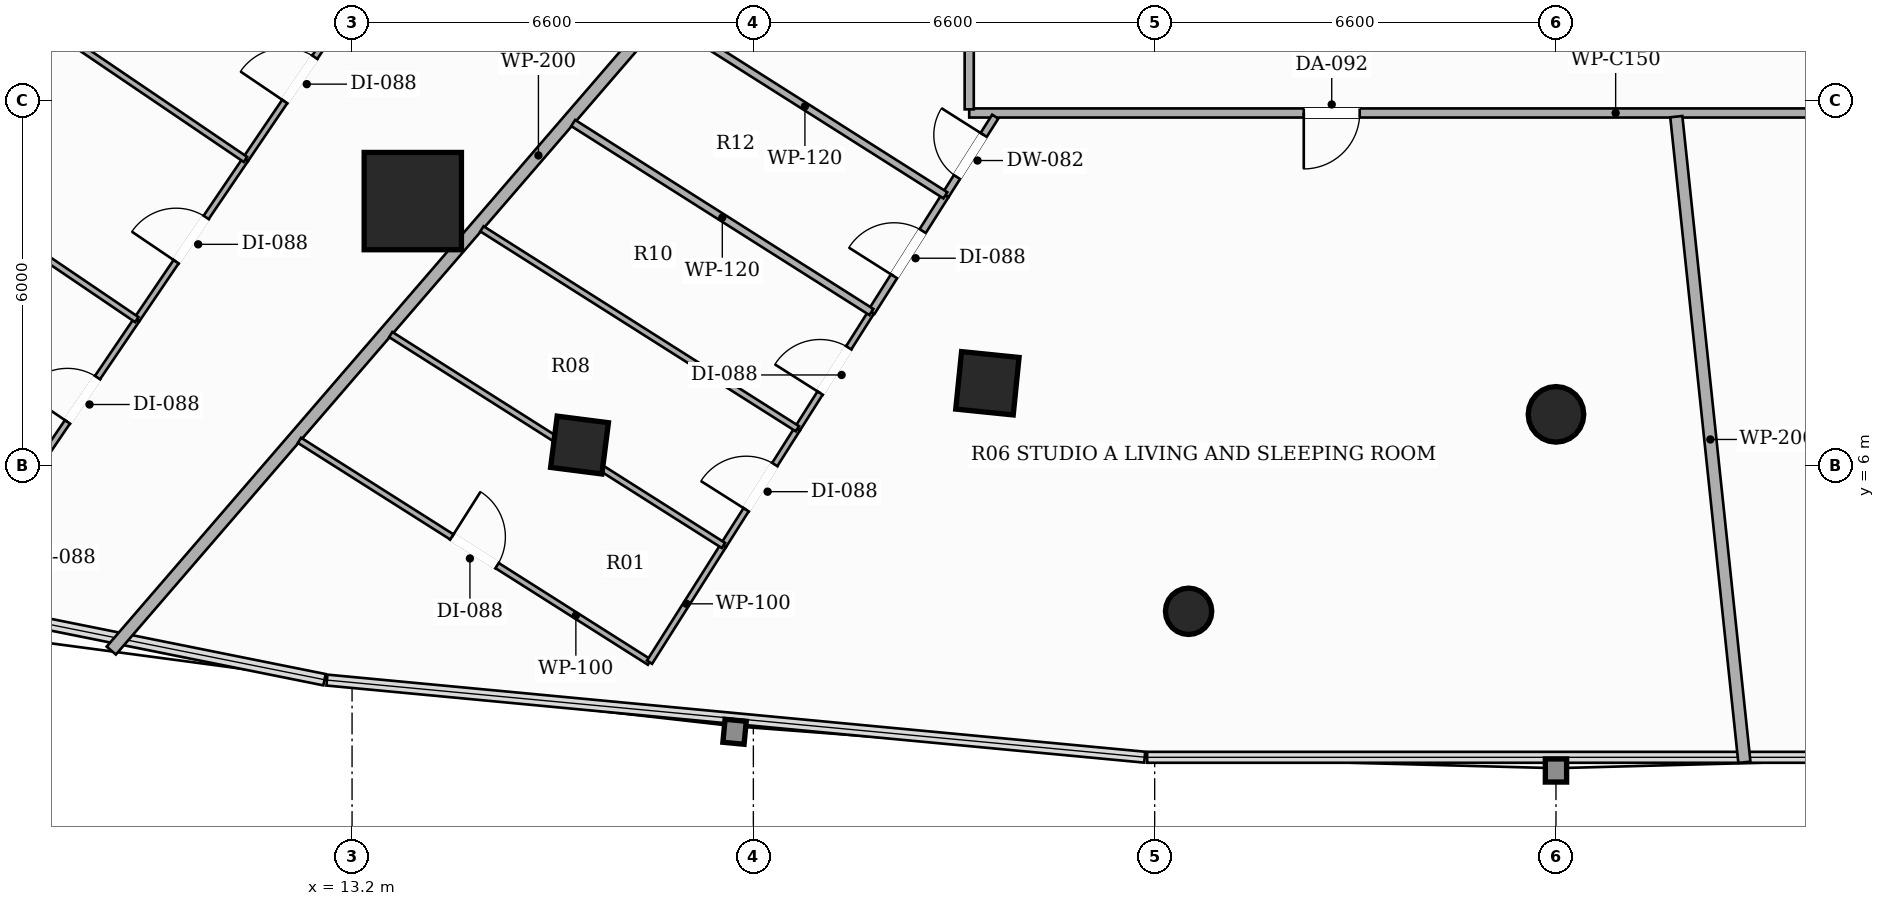
"""IFC4 building model, lengths in metres.
Left out: names, types, materials, properties, quantities, classifications, styles, units other than length and angle.
Written with IfcOpenShell. Run it as: python <this file> out.ifc"""

import sys

from ifc_helpers import new_model, si_unit, direction, frame, frame_2d, origin, origin_2d, place, context, subcontext, project, spatial, rectangle, hollow_rectangle, hollow_circle, extrude, element, fill, save


model = new_model("IFC4")
c1 = context("Model", 3, precision=1e-05, world=origin(), true_north=direction((0.0, 1.0)))
c2 = subcontext(c1, "Body", "Model", "MODEL_VIEW")
j1 = project(units=[si_unit("LENGTHUNIT", "METRE"), si_unit("PLANEANGLEUNIT", "RADIAN")], contexts=[c1])
p1 = place(None, origin())
s1 = spatial("IfcSite", under=j1, at=p1, CompositionType="ELEMENT")
p2 = place(p1, origin())
s2 = spatial("IfcBuilding", under=s1, at=p2, CompositionType="ELEMENT")
p3 = place(p2, frame((0.0, 0.0, 26.9)))
s3 = spatial("IfcBuildingStorey", under=s2, at=p3, CompositionType="ELEMENT", Elevation=26.9)
p4 = place(p3, frame((14.199, 10.351, 0.0), z_axis=(0.0, 0.0, 1.0), x_axis=(1.0, 0.0, 0.0)))
e1 = element("IfcColumn", 1, at=p4, inside=s3, PredefinedType="COLUMN", context=c2, shape_type="SweptSolid", body=[
    extrude(hollow_rectangle(XDim=1.6, YDim=1.6, WallThickness=0.05, at=origin_2d()), origin(), (0.0, 0.0, 1.0), 3.3),
])
p5 = place(p3, frame((23.649, 7.355, 0.0), z_axis=(0.0, 0.0, 1.0), x_axis=(-0.994880708829, 0.101056297183, 0.0)))
e2 = element("IfcColumn", 2, at=p5, inside=s3, PredefinedType="COLUMN", context=c2, shape_type="SweptSolid", body=[
    extrude(hollow_rectangle(XDim=0.95, YDim=0.95, WallThickness=0.032, at=origin_2d()), origin(), (0.0, 0.0, 1.0), 3.3),
])
p6 = place(p3, frame((33.0, 6.844, 0.0), z_axis=(0.0, 0.0, 1.0), x_axis=(1.0, 0.0, 0.0)))
e3 = element("IfcColumn", 3, at=p6, inside=s3, PredefinedType="COLUMN", context=c2, shape_type="SweptSolid", body=[
    extrude(hollow_circle(Radius=0.457, WallThickness=0.025, at=origin_2d()), origin(), (0.0, 0.0, 1.0), 3.3),
])
p7 = place(p3, frame((16.941, 6.339, 0.0), z_axis=(0.0, 0.0, 1.0), x_axis=(-0.99189444259, 0.127064608601, 0.0)))
e4 = element("IfcColumn", 4, at=p7, inside=s3, PredefinedType="COLUMN", context=c2, shape_type="SweptSolid", body=[
    extrude(hollow_rectangle(XDim=0.85, YDim=0.85, WallThickness=0.028, at=origin_2d()), origin(), (0.0, 0.0, 1.0), 3.3),
])
p8 = place(p3, frame((26.958, 3.605, 0.0), z_axis=(0.0, 0.0, 1.0), x_axis=(1.0, 0.0, 0.0)))
e5 = element("IfcColumn", 5, at=p8, inside=s3, PredefinedType="COLUMN", context=c2, shape_type="SweptSolid", body=[
    extrude(hollow_circle(Radius=0.381, WallThickness=0.022, at=origin_2d()), origin(), (0.0, 0.0, 1.0), 3.3),
])
p9 = place(p3, frame((42.59, 11.8, 0.0), z_axis=(0.0, 0.0, 1.0), x_axis=(-1.0, 0.0, 0.0)))
e6 = element("IfcWall", 6, at=p9, inside=s3, PredefinedType="PARTITIONING", context=c2, shape_type="SweptSolid", body=[
    extrude(rectangle(XDim=19.24, YDim=0.15, at=frame_2d((9.62, 0.0))), origin(), (0.0, 0.0, 1.0), 2.669),
])
p10 = place(p9, frame((12.818, 0.0, 0.0)))
e7 = element("IfcOpeningElement", 7, at=p10, cuts=e6, PredefinedType="OPENING", context=c2, shape_type="SweptSolid", body=[
    extrude(rectangle(XDim=0.92, YDim=2.15, at=frame_2d((0.46, 1.075))), frame((0.0, 0.085, 0.0), z_axis=(0.0, -1.0, 0.0), x_axis=(1.0, 0.0, 0.0)), (0.0, 0.0, 1.0), 0.17),
])
p11 = place(p9, frame((3.519, 0.0, 0.0)))
e8 = element("IfcOpeningElement", 8, at=p11, cuts=e6, PredefinedType="OPENING", context=c2, shape_type="SweptSolid", body=[
    extrude(rectangle(XDim=0.88, YDim=2.1, at=frame_2d((0.44, 1.05))), frame((0.0, 0.085, 0.0), z_axis=(0.0, -1.0, 0.0), x_axis=(1.0, 0.0, 0.0)), (0.0, 0.0, 1.0), 0.17),
])
p12 = place(p3, frame((23.35, 11.86, 0.0), z_axis=(0.0, 0.0, 1.0), x_axis=(0.0, 1.0, 0.0)))
e9 = element("IfcWall", 9, at=p12, inside=s3, PredefinedType="PARTITIONING", context=c2, shape_type="SweptSolid", body=[
    extrude(rectangle(XDim=25.04, YDim=0.15, at=frame_2d((12.52, 0.0))), origin(), (0.0, 0.0, 1.0), 2.413),
])
p13 = place(p12, frame((9.872, 0.0, 0.0)))
e10 = element("IfcOpeningElement", 10, at=p13, cuts=e9, PredefinedType="OPENING", context=c2, shape_type="SweptSolid", body=[
    extrude(rectangle(XDim=0.92, YDim=2.15, at=frame_2d((0.46, 1.075))), frame((0.0, 0.085, 0.0), z_axis=(0.0, -1.0, 0.0), x_axis=(1.0, 0.0, 0.0)), (0.0, 0.0, 1.0), 0.17),
])
p14 = place(p12, frame((18.578, 0.0, 0.0)))
e11 = element("IfcOpeningElement", 11, at=p14, cuts=e9, PredefinedType="OPENING", context=c2, shape_type="SweptSolid", body=[
    extrude(rectangle(XDim=0.88, YDim=2.1, at=frame_2d((0.44, 1.05))), frame((0.0, 0.085, 0.0), z_axis=(0.0, -1.0, 0.0), x_axis=(1.0, 0.0, 0.0)), (0.0, 0.0, 1.0), 0.17),
])
p15 = place(p3, frame((9.24, 2.959, 0.0), z_axis=(0.0, 0.0, 1.0), x_axis=(0.653213734957, 0.757173570896, 0.0)))
e12 = element("IfcWall", 12, at=p15, inside=s3, PredefinedType="PARTITIONING", context=c2, shape_type="SweptSolid", body=[
    extrude(rectangle(XDim=21.509, YDim=0.2, at=frame_2d((10.754, 0.0))), origin(), (0.0, 0.0, 1.0), 2.413),
])
p16 = place(p3, frame((34.979, 11.74, 0.0), z_axis=(0.0, 0.0, 1.0), x_axis=(0.104910939681, -0.994481621115, 0.0)))
e13 = element("IfcWall", 13, at=p16, inside=s3, PredefinedType="PARTITIONING", context=c2, shape_type="SweptSolid", body=[
    extrude(rectangle(XDim=10.677, YDim=0.2, at=frame_2d((5.338, 0.0))), origin(), (0.0, 0.0, 1.0), 2.413),
])
p17 = place(p3, frame((22.958, 10.446, 0.0), z_axis=(0.0, 0.0, 1.0), x_axis=(0.535317457649, 0.844650945383, 0.0)))
e14 = element("IfcWall", 14, at=p17, inside=s3, PredefinedType="PARTITIONING", context=c2, shape_type="SweptSolid", body=[
    extrude(rectangle(XDim=1.532, YDim=0.12, at=frame_2d((0.766, 0.0))), origin(), (0.0, 0.0, 1.0), 3.06),
])
p18 = place(p17, frame((0.356, 0.0, 0.0)))
e15 = element("IfcOpeningElement", 15, at=p18, cuts=e14, PredefinedType="OPENING", context=c2, shape_type="SweptSolid", body=[
    extrude(rectangle(XDim=0.82, YDim=2.1, at=frame_2d((0.41, 1.05))), frame((0.0, 0.07, 0.0), z_axis=(0.0, -1.0, 0.0), x_axis=(1.0, 0.0, 0.0)), (0.0, 0.0, 1.0), 0.14),
])
p19 = place(p3, frame((21.741, 8.527, 0.0), z_axis=(0.0, 0.0, 1.0), x_axis=(0.535588747522, 0.844478947948, 0.0)))
e16 = element("IfcWall", 16, at=p19, inside=s3, PredefinedType="PARTITIONING", context=c2, shape_type="SweptSolid", body=[
    extrude(rectangle(XDim=2.272, YDim=0.12, at=frame_2d((1.136, 0.0))), origin(), (0.0, 0.0, 1.0), 3.06),
])
p20 = place(p19, frame((0.696, 0.0, 0.0)))
e17 = element("IfcOpeningElement", 17, at=p20, cuts=e16, PredefinedType="OPENING", context=c2, shape_type="SweptSolid", body=[
    extrude(rectangle(XDim=0.88, YDim=2.1, at=frame_2d((0.44, 1.05))), frame((0.0, 0.07, 0.0), z_axis=(0.0, -1.0, 0.0), x_axis=(1.0, 0.0, 0.0)), (0.0, 0.0, 1.0), 0.14),
])
p21 = place(p3, frame((12.335, 6.417, 0.0), z_axis=(0.0, 0.0, 1.0), x_axis=(0.844634990869, -0.535342630657, 0.0)))
e18 = element("IfcWall", 18, at=p21, inside=s3, PredefinedType="PARTITIONING", context=c2, shape_type="SweptSolid", body=[
    extrude(rectangle(XDim=6.816, YDim=0.1, at=frame_2d((3.408, 0.0))), origin(), (0.0, 0.0, 1.0), 2.619),
])
p22 = place(p21, frame((2.968, 0.0, 0.0)))
e19 = element("IfcOpeningElement", 19, at=p22, cuts=e18, PredefinedType="OPENING", context=c2, shape_type="SweptSolid", body=[
    extrude(rectangle(XDim=0.88, YDim=2.1, at=frame_2d((0.44, 1.05))), frame((0.0, 0.06, 0.0), z_axis=(0.0, -1.0, 0.0), x_axis=(1.0, 0.0, 0.0)), (0.0, 0.0, 1.0), 0.12),
])
p23 = place(p3, frame((18.092, 2.768, 0.0), z_axis=(0.0, 0.0, 1.0), x_axis=(0.535087860904, 0.844796414003, 0.0)))
e20 = element("IfcWall", 20, at=p23, inside=s3, PredefinedType="PARTITIONING", context=c2, shape_type="SweptSolid", body=[
    extrude(rectangle(XDim=2.273, YDim=0.1, at=frame_2d((1.136, 0.0))), origin(), (0.0, 0.0, 1.0), 3.06),
])
p24 = place(p3, frame((19.308, 4.688, 0.0), z_axis=(0.0, 0.0, 1.0), x_axis=(0.535512120593, 0.844527541705, 0.0)))
e21 = element("IfcWall", 21, at=p24, inside=s3, PredefinedType="PARTITIONING", context=c2, shape_type="SweptSolid", body=[
    extrude(rectangle(XDim=2.272, YDim=0.1, at=frame_2d((1.136, 0.0))), origin(), (0.0, 0.0, 1.0), 2.413),
])
p25 = place(p24, frame((0.696, 0.0, 0.0)))
e22 = element("IfcOpeningElement", 22, at=p25, cuts=e21, PredefinedType="OPENING", context=c2, shape_type="SweptSolid", body=[
    extrude(rectangle(XDim=0.88, YDim=2.1, at=frame_2d((0.44, 1.05))), frame((0.0, 0.06, 0.0), z_axis=(0.0, -1.0, 0.0), x_axis=(1.0, 0.0, 0.0)), (0.0, 0.0, 1.0), 0.12),
])
p26 = place(p3, frame((20.525, 6.607, 0.0), z_axis=(0.0, 0.0, 1.0), x_axis=(0.53503930364, 0.844827167864, 0.0)))
e23 = element("IfcWall", 23, at=p26, inside=s3, PredefinedType="PARTITIONING", context=c2, shape_type="SweptSolid", body=[
    extrude(rectangle(XDim=2.273, YDim=0.1, at=frame_2d((1.136, 0.0))), origin(), (0.0, 0.0, 1.0), 2.413),
])
p27 = place(p26, frame((0.696, 0.0, 0.0)))
e24 = element("IfcOpeningElement", 24, at=p27, cuts=e23, PredefinedType="OPENING", context=c2, shape_type="SweptSolid", body=[
    extrude(rectangle(XDim=0.88, YDim=2.1, at=frame_2d((0.44, 1.05))), frame((0.0, 0.06, 0.0), z_axis=(0.0, -1.0, 0.0), x_axis=(1.0, 0.0, 0.0)), (0.0, 0.0, 1.0), 0.12),
])
p28 = place(p3, frame((22.958, 10.446, 0.0), z_axis=(0.0, 0.0, 1.0), x_axis=(-0.844661668189, 0.535300538289, 0.0)))
e25 = element("IfcWall", 25, at=p28, inside=s3, PredefinedType="PARTITIONING", context=c2, shape_type="SweptSolid", body=[
    extrude(rectangle(XDim=5.47, YDim=0.12, at=frame_2d((2.735, 0.0))), origin(), (0.0, 0.0, 1.0), 2.669),
])
p29 = place(p3, frame((21.741, 8.527, 0.0), z_axis=(0.0, 0.0, 1.0), x_axis=(-0.84466254328, 0.535299157463, 0.0)))
e26 = element("IfcWall", 26, at=p29, inside=s3, PredefinedType="PARTITIONING", context=c2, shape_type="SweptSolid", body=[
    extrude(rectangle(XDim=5.806, YDim=0.12, at=frame_2d((2.903, 0.0))), origin(), (0.0, 0.0, 1.0), 2.669),
])
p30 = place(p3, frame((13.836, 8.156, 0.0), z_axis=(0.0, 0.0, 1.0), x_axis=(0.844657780298, -0.535306673023, 0.0)))
e27 = element("IfcWall", 27, at=p30, inside=s3, PredefinedType="PARTITIONING", context=c2, shape_type="SweptSolid", body=[
    extrude(rectangle(XDim=6.479, YDim=0.1, at=frame_2d((3.239, 0.0))), origin(), (0.0, 0.0, 1.0), 2.413),
])
p31 = place(p3, frame((15.336, 9.895, 0.0), z_axis=(0.0, 0.0, 1.0), x_axis=(0.844690904033, -0.535254403666, 0.0)))
e28 = element("IfcWall", 28, at=p31, inside=s3, PredefinedType="PARTITIONING", context=c2, shape_type="SweptSolid", body=[
    extrude(rectangle(XDim=6.143, YDim=0.1, at=frame_2d((3.072, 0.0))), origin(), (0.0, 0.0, 1.0), 2.413),
])
p32 = place(p3, frame((11.447, 11.036, 0.0), z_axis=(0.0, 0.0, 1.0), x_axis=(0.561180574224, 0.827693399221, 0.0)))
e29 = element("IfcWall", 29, at=p32, inside=s3, PredefinedType="PARTITIONING", context=c2, shape_type="SweptSolid", body=[
    extrude(rectangle(XDim=3.182, YDim=0.1, at=frame_2d((1.591, 0.0))), origin(), (0.0, 0.0, 1.0), 2.413),
])
p33 = place(p32, frame((1.151, 0.0, 0.0)))
e30 = element("IfcOpeningElement", 30, at=p33, cuts=e29, PredefinedType="OPENING", context=c2, shape_type="SweptSolid", body=[
    extrude(rectangle(XDim=0.88, YDim=2.1, at=frame_2d((0.44, 1.05))), frame((0.0, 0.06, 0.0), z_axis=(0.0, -1.0, 0.0), x_axis=(1.0, 0.0, 0.0)), (0.0, 0.0, 1.0), 0.12),
])
p34 = place(p3, frame((9.66, 8.402, 0.0), z_axis=(0.0, 0.0, 1.0), x_axis=(0.561478909132, 0.827491048048, 0.0)))
e31 = element("IfcWall", 31, at=p34, inside=s3, PredefinedType="PARTITIONING", context=c2, shape_type="SweptSolid", body=[
    extrude(rectangle(XDim=3.183, YDim=0.1, at=frame_2d((1.591, 0.0))), origin(), (0.0, 0.0, 1.0), 2.619),
])
p35 = place(p34, frame((1.151, 0.0, 0.0)))
e32 = element("IfcOpeningElement", 32, at=p35, cuts=e31, PredefinedType="OPENING", context=c2, shape_type="SweptSolid", body=[
    extrude(rectangle(XDim=0.88, YDim=2.1, at=frame_2d((0.44, 1.05))), frame((0.0, 0.06, 0.0), z_axis=(0.0, -1.0, 0.0), x_axis=(1.0, 0.0, 0.0)), (0.0, 0.0, 1.0), 0.12),
])
p36 = place(p3, frame((7.873, 5.768, 0.0), z_axis=(0.0, 0.0, 1.0), x_axis=(0.561390746336, 0.827550862442, 0.0)))
e33 = element("IfcWall", 33, at=p36, inside=s3, PredefinedType="PARTITIONING", context=c2, shape_type="SweptSolid", body=[
    extrude(rectangle(XDim=3.183, YDim=0.1, at=frame_2d((1.591, 0.0))), origin(), (0.0, 0.0, 1.0), 2.619),
])
p37 = place(p36, frame((1.151, 0.0, 0.0)))
e34 = element("IfcOpeningElement", 34, at=p37, cuts=e33, PredefinedType="OPENING", context=c2, shape_type="SweptSolid", body=[
    extrude(rectangle(XDim=0.88, YDim=2.1, at=frame_2d((0.44, 1.05))), frame((0.0, 0.06, 0.0), z_axis=(0.0, -1.0, 0.0), x_axis=(1.0, 0.0, 0.0)), (0.0, 0.0, 1.0), 0.12),
])
p38 = place(p3, frame((11.447, 11.036, 0.0), z_axis=(0.0, 0.0, 1.0), x_axis=(-0.827600351797, 0.561317786735, 0.0)))
e35 = element("IfcWall", 35, at=p38, inside=s3, PredefinedType="PARTITIONING", context=c2, shape_type="SweptSolid", body=[
    extrude(rectangle(XDim=5.332, YDim=0.1, at=frame_2d((2.666, 0.0))), origin(), (0.0, 0.0, 1.0), 3.06),
])
p39 = place(p3, frame((9.66, 8.402, 0.0), z_axis=(0.0, 0.0, 1.0), x_axis=(-0.827540801305, 0.561405577257, 0.0)))
e36 = element("IfcWall", 36, at=p39, inside=s3, PredefinedType="PARTITIONING", context=c2, shape_type="SweptSolid", body=[
    extrude(rectangle(XDim=4.734, YDim=0.1, at=frame_2d((2.367, 0.0))), origin(), (0.0, 0.0, 1.0), 2.619),
])
p40 = place(p10, origin())
e37 = element("IfcDoor", 37, at=p40, inside=s3, OperationType="SINGLE_SWING_RIGHT", PredefinedType="DOOR", context=c2, shape_type="SweptSolid", body=[
    extrude(rectangle(XDim=0.92, YDim=2.15, at=frame_2d((0.46, 1.075))), frame((0.0, 0.025, 0.0), z_axis=(0.0, -1.0, 0.0), x_axis=(1.0, 0.0, 0.0)), (0.0, 0.0, 1.0), 0.05),
])
fill(e7, e37)
p41 = place(p18, origin())
e38 = element("IfcDoor", 38, at=p41, inside=s3, OperationType="SINGLE_SWING_RIGHT", PredefinedType="DOOR", context=c2, shape_type="SweptSolid", body=[
    extrude(rectangle(XDim=0.82, YDim=2.1, at=frame_2d((0.41, 1.05))), frame((0.0, 0.025, 0.0), z_axis=(0.0, -1.0, 0.0), x_axis=(1.0, 0.0, 0.0)), (0.0, 0.0, 1.0), 0.05),
])
fill(e15, e38)
p42 = place(p20, origin())
e39 = element("IfcDoor", 39, at=p42, inside=s3, OperationType="SINGLE_SWING_LEFT", PredefinedType="DOOR", context=c2, shape_type="SweptSolid", body=[
    extrude(rectangle(XDim=0.88, YDim=2.1, at=frame_2d((0.44, 1.05))), frame((0.0, 0.025, 0.0), z_axis=(0.0, -1.0, 0.0), x_axis=(1.0, 0.0, 0.0)), (0.0, 0.0, 1.0), 0.05),
])
fill(e17, e39)
p43 = place(p22, origin())
e40 = element("IfcDoor", 40, at=p43, inside=s3, OperationType="SINGLE_SWING_LEFT", PredefinedType="DOOR", context=c2, shape_type="SweptSolid", body=[
    extrude(rectangle(XDim=0.88, YDim=2.1, at=frame_2d((0.44, 1.05))), frame((0.0, 0.025, 0.0), z_axis=(0.0, -1.0, 0.0), x_axis=(1.0, 0.0, 0.0)), (0.0, 0.0, 1.0), 0.05),
])
fill(e19, e40)
p44 = place(p25, origin())
e41 = element("IfcDoor", 41, at=p44, inside=s3, OperationType="SINGLE_SWING_LEFT", PredefinedType="DOOR", context=c2, shape_type="SweptSolid", body=[
    extrude(rectangle(XDim=0.88, YDim=2.1, at=frame_2d((0.44, 1.05))), frame((0.0, 0.025, 0.0), z_axis=(0.0, -1.0, 0.0), x_axis=(1.0, 0.0, 0.0)), (0.0, 0.0, 1.0), 0.05),
])
fill(e22, e41)
p45 = place(p27, origin())
e42 = element("IfcDoor", 42, at=p45, inside=s3, OperationType="SINGLE_SWING_LEFT", PredefinedType="DOOR", context=c2, shape_type="SweptSolid", body=[
    extrude(rectangle(XDim=0.88, YDim=2.1, at=frame_2d((0.44, 1.05))), frame((0.0, 0.025, 0.0), z_axis=(0.0, -1.0, 0.0), x_axis=(1.0, 0.0, 0.0)), (0.0, 0.0, 1.0), 0.05),
])
fill(e24, e42)
p46 = place(p33, origin())
e43 = element("IfcDoor", 43, at=p46, inside=s3, OperationType="SINGLE_SWING_LEFT", PredefinedType="DOOR", context=c2, shape_type="SweptSolid", body=[
    extrude(rectangle(XDim=0.88, YDim=2.1, at=frame_2d((0.44, 1.05))), frame((0.0, 0.025, 0.0), z_axis=(0.0, -1.0, 0.0), x_axis=(1.0, 0.0, 0.0)), (0.0, 0.0, 1.0), 0.05),
])
fill(e30, e43)
p47 = place(p35, origin())
e44 = element("IfcDoor", 44, at=p47, inside=s3, OperationType="SINGLE_SWING_LEFT", PredefinedType="DOOR", context=c2, shape_type="SweptSolid", body=[
    extrude(rectangle(XDim=0.88, YDim=2.1, at=frame_2d((0.44, 1.05))), frame((0.0, 0.025, 0.0), z_axis=(0.0, -1.0, 0.0), x_axis=(1.0, 0.0, 0.0)), (0.0, 0.0, 1.0), 0.05),
])
fill(e32, e44)
p48 = place(p37, origin())
e45 = element("IfcDoor", 45, at=p48, inside=s3, OperationType="SINGLE_SWING_LEFT", PredefinedType="DOOR", context=c2, shape_type="SweptSolid", body=[
    extrude(rectangle(XDim=0.88, YDim=2.1, at=frame_2d((0.44, 1.05))), frame((0.0, 0.025, 0.0), z_axis=(0.0, -1.0, 0.0), x_axis=(1.0, 0.0, 0.0)), (0.0, 0.0, 1.0), 0.05),
])
fill(e34, e45)
save(model, sys.argv[1])
